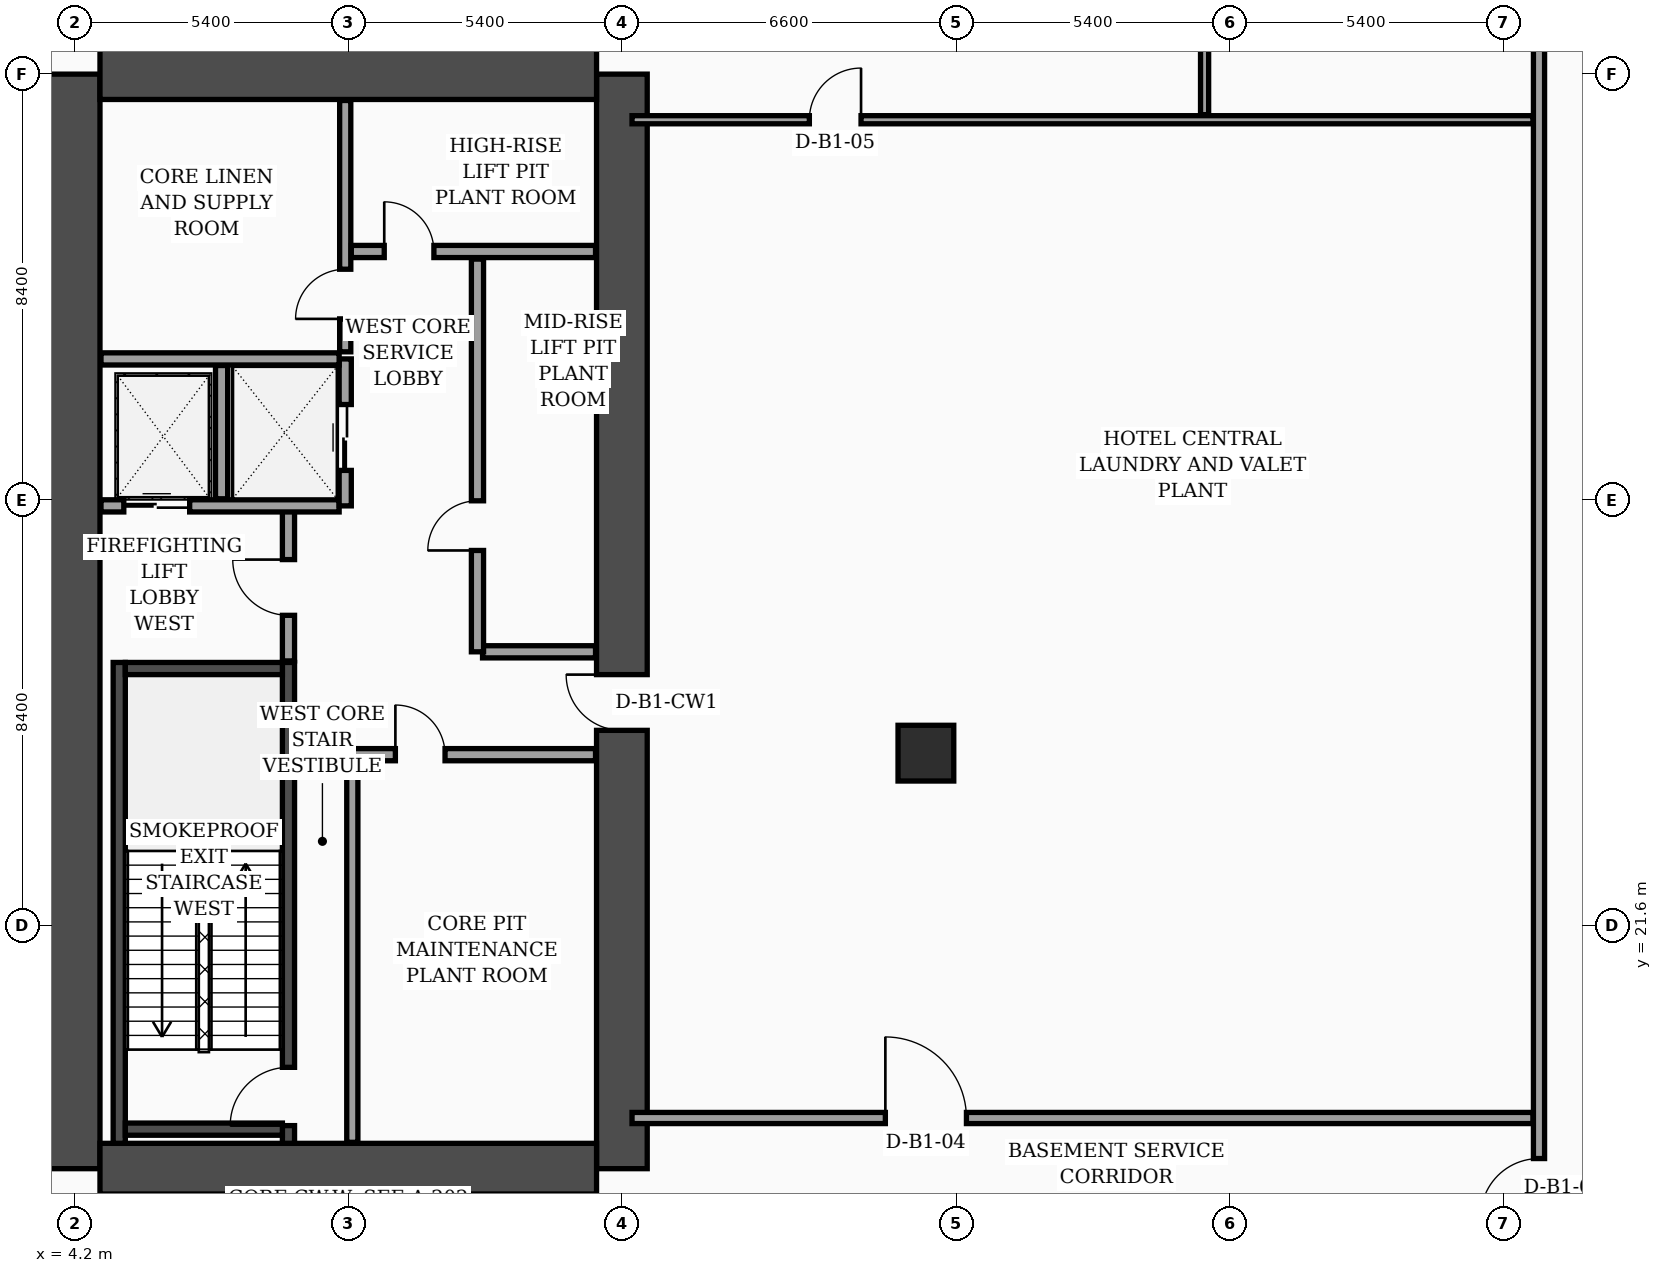
"""IFC4 building model, lengths in metres.
Left out: names, types, materials, properties, quantities, classifications, styles, units other than length and angle.
Written with IfcOpenShell. Run it as: python <this file> out.ifc"""

import sys

from ifc_helpers import new_model, si_unit, direction, frame, frame_2d, origin, origin_2d, place, context, subcontext, project, spatial, rectangle, hollow_rectangle, extrude, element, fill, save


model = new_model("IFC4")
c1 = context("Model", 3, precision=1e-05, world=origin(), true_north=direction((0.0, 1.0)))
c2 = subcontext(c1, "Body", "Model", "MODEL_VIEW")
j1 = project(units=[si_unit("LENGTHUNIT", "METRE"), si_unit("PLANEANGLEUNIT", "RADIAN")], contexts=[c1])
p1 = place(None, origin())
s1 = spatial("IfcSite", under=j1, at=p1, CompositionType="ELEMENT")
p2 = place(p1, origin())
s2 = spatial("IfcBuilding", under=s1, at=p2, CompositionType="ELEMENT")
p3 = place(p2, frame((0.0, 0.0, -5.2)))
s3 = spatial("IfcBuildingStorey", under=s2, at=p3, CompositionType="ELEMENT", Elevation=-5.2)
p4 = place(p3, frame((4.2, 16.8, 0.0), z_axis=(0.0, 0.0, 1.0), x_axis=(0.0, 1.0, 0.0)))
e1 = element("IfcWall", 1, at=p4, inside=s3, PredefinedType="SHEAR", context=c2, shape_type="SweptSolid", body=[
    extrude(rectangle(XDim=21.6, YDim=1.0, at=frame_2d((10.8, 0.0))), origin(), (0.0, 0.0, 1.0), 4.88),
])
p5 = place(p3, frame((15.0, 16.8, 0.0), z_axis=(0.0, 0.0, 1.0), x_axis=(0.0, 1.0, 0.0)))
e2 = element("IfcWall", 2, at=p5, inside=s3, PredefinedType="SHEAR", context=c2, shape_type="SweptSolid", body=[
    extrude(rectangle(XDim=21.6, YDim=1.0, at=frame_2d((10.8, 0.0))), origin(), (0.0, 0.0, 1.0), 4.88),
])
p6 = place(p5, frame((8.65, 0.0, 0.0)))
e3 = element("IfcOpeningElement", 3, at=p6, cuts=e2, PredefinedType="OPENING", context=c2, shape_type="SweptSolid", body=[
    extrude(rectangle(XDim=1.1, YDim=2.2, at=frame_2d((0.55, 1.1))), frame((0.0, 0.51, 0.0), z_axis=(0.0, -1.0, 0.0), x_axis=(1.0, 0.0, 0.0)), (0.0, 0.0, 1.0), 1.02),
])
for number, where, z_axis, x_axis in (
    (4, (4.7, 38.4, 0.0), (0.0, 0.0, 1.0), (1.0, 0.0, 0.0)),
    (5, (4.7, 16.8, 0.0), (0.0, 0.0, 1.0), (1.0, 0.0, 0.0)),
):
    element("IfcWall", number, at=place(p3, frame(where, z_axis=z_axis, x_axis=x_axis)), inside=s3, PredefinedType="SHEAR", context=c2, shape_type="SweptSolid", body=[
        extrude(rectangle(XDim=9.8, YDim=1.0, at=frame_2d((4.9, 0.0))), origin(), (0.0, 0.0, 1.0), 4.88),
    ])
p7 = place(p3, frame((5.08, 17.3, 0.0), z_axis=(0.0, 0.0, 1.0), x_axis=(0.0, 1.0, 0.0)))
e6 = element("IfcWall", 6, at=p7, inside=s3, PredefinedType="SOLIDWALL", context=c2, shape_type="SweptSolid", body=[
    extrude(rectangle(XDim=9.49, YDim=0.24, at=frame_2d((4.745, 0.0))), origin(), (0.0, 0.0, 1.0), 4.88),
])
p8 = place(p3, frame((8.42, 17.3, 0.0), z_axis=(0.0, 0.0, 1.0), x_axis=(0.0, 1.0, 0.0)))
e7 = element("IfcWall", 7, at=p8, inside=s3, PredefinedType="SOLIDWALL", context=c2, shape_type="SweptSolid", body=[
    extrude(rectangle(XDim=9.49, YDim=0.24, at=frame_2d((4.745, 0.0))), origin(), (0.0, 0.0, 1.0), 4.88),
])
p9 = place(p8, frame((0.35, 0.0, 0.0)))
e8 = element("IfcOpeningElement", 8, at=p9, cuts=e7, PredefinedType="OPENING", context=c2, shape_type="SweptSolid", body=[
    extrude(rectangle(XDim=1.15, YDim=2.2, at=frame_2d((0.575, 1.1))), frame((0.0, 0.13, 0.0), z_axis=(0.0, -1.0, 0.0), x_axis=(1.0, 0.0, 0.0)), (0.0, 0.0, 1.0), 0.26),
])
for number, where, z_axis, x_axis in (
    (9, (5.2, 17.58, 0.0), (0.0, 0.0, 1.0), (1.0, 0.0, 0.0)),
    (10, (5.2, 26.67, 0.0), (0.0, 0.0, 1.0), (1.0, 0.0, 0.0)),
):
    element("IfcWall", number, at=place(p3, frame(where, z_axis=z_axis, x_axis=x_axis)), inside=s3, PredefinedType="SOLIDWALL", context=c2, shape_type="SweptSolid", body=[
        extrude(rectangle(XDim=3.1, YDim=0.24, at=frame_2d((1.55, 0.0))), origin(), (0.0, 0.0, 1.0), 4.88),
    ])
p10 = place(p3, frame((21.0, 25.0, 0.0), z_axis=(0.0, 0.0, 1.0), x_axis=(1.0, 0.0, 0.0)))
e11 = element("IfcColumn", 11, at=p10, inside=s3, PredefinedType="COLUMN", context=c2, shape_type="SweptSolid", body=[
    extrude(hollow_rectangle(XDim=1.1, YDim=1.1, WallThickness=0.045, at=origin_2d()), origin(), (0.0, 0.0, 1.0), 4.88),
])
p11 = place(p3, frame((8.42, 26.82, 0.0), z_axis=(0.0, 0.0, 1.0), x_axis=(0.0, 1.0, 0.0)))
e12 = element("IfcWall", 12, at=p11, inside=s3, PredefinedType="SOLIDWALL", context=c2, shape_type="SweptSolid", body=[
    extrude(rectangle(XDim=3.0, YDim=0.24, at=frame_2d((1.5, 0.0))), origin(), (0.0, 0.0, 1.0), 4.88),
])
p12 = place(p11, frame((0.9, 0.0, 0.0)))
e13 = element("IfcOpeningElement", 13, at=p12, cuts=e12, PredefinedType="OPENING", context=c2, shape_type="SweptSolid", body=[
    extrude(rectangle(XDim=1.1, YDim=2.2, at=frame_2d((0.55, 1.1))), frame((0.0, 0.13, 0.0), z_axis=(0.0, -1.0, 0.0), x_axis=(1.0, 0.0, 0.0)), (0.0, 0.0, 1.0), 0.26),
])
p13 = place(p3, frame((4.72, 29.88, 0.0), z_axis=(0.0, 0.0, 1.0), x_axis=(1.0, 0.0, 0.0)))
e14 = element("IfcWall", 14, at=p13, inside=s3, PredefinedType="SOLIDWALL", context=c2, shape_type="SweptSolid", body=[
    extrude(rectangle(XDim=4.7, YDim=0.24, at=frame_2d((2.35, 0.0))), origin(), (0.0, 0.0, 1.0), 4.88),
])
p14 = place(p13, frame((0.45, 0.0, 0.0)))
e15 = element("IfcOpeningElement", 15, at=p14, cuts=e14, PredefinedType="OPENING", context=c2, shape_type="SweptSolid", body=[
    extrude(rectangle(XDim=1.3, YDim=2.35, at=frame_2d((0.65, 1.175))), frame((0.0, 0.13, 0.0), z_axis=(0.0, -1.0, 0.0), x_axis=(1.0, 0.0, 0.0)), (0.0, 0.0, 1.0), 0.26),
])
p15 = place(p3, frame((7.1, 30.02, 0.0), z_axis=(0.0, 0.0, 1.0), x_axis=(0.0, 1.0, 0.0)))
e16 = element("IfcWall", 16, at=p15, inside=s3, PredefinedType="SOLIDWALL", context=c2, shape_type="SweptSolid", body=[
    extrude(rectangle(XDim=2.63, YDim=0.24, at=frame_2d((1.315, 0.0))), origin(), (0.0, 0.0, 1.0), 4.88),
])
p16 = place(p3, frame((9.54, 29.88, 0.0), z_axis=(0.0, 0.0, 1.0), x_axis=(0.0, 1.0, 0.0)))
e17 = element("IfcWall", 17, at=p16, inside=s3, PredefinedType="SOLIDWALL", context=c2, shape_type="SweptSolid", body=[
    extrude(rectangle(XDim=2.9, YDim=0.24, at=frame_2d((1.45, 0.0))), origin(), (0.0, 0.0, 1.0), 4.88),
])
p17 = place(p16, frame((0.7, 0.0, 0.0)))
e18 = element("IfcOpeningElement", 18, at=p17, cuts=e17, PredefinedType="OPENING", context=c2, shape_type="SweptSolid", body=[
    extrude(rectangle(XDim=1.3, YDim=2.35, at=frame_2d((0.65, 1.175))), frame((0.0, 0.13, 0.0), z_axis=(0.0, -1.0, 0.0), x_axis=(1.0, 0.0, 0.0)), (0.0, 0.0, 1.0), 0.26),
])
p18 = place(p3, frame((4.72, 32.78, 0.0), z_axis=(0.0, 0.0, 1.0), x_axis=(1.0, 0.0, 0.0)))
e19 = element("IfcWall", 19, at=p18, inside=s3, PredefinedType="SOLIDWALL", context=c2, shape_type="SweptSolid", body=[
    extrude(rectangle(XDim=4.7, YDim=0.24, at=frame_2d((2.35, 0.0))), origin(), (0.0, 0.0, 1.0), 4.88),
])
p19 = place(p3, frame((9.68, 17.32, 0.0), z_axis=(0.0, 0.0, 1.0), x_axis=(0.0, 1.0, 0.0)))
e20 = element("IfcWall", 20, at=p19, inside=s3, PredefinedType="SOLIDWALL", context=c2, shape_type="SweptSolid", body=[
    extrude(rectangle(XDim=7.68, YDim=0.22, at=frame_2d((3.84, 0.0))), origin(), (0.0, 0.0, 1.0), 4.88),
])
p20 = place(p3, frame((9.54, 32.92, 0.0), z_axis=(0.0, 0.0, 1.0), x_axis=(0.0, 1.0, 0.0)))
e21 = element("IfcWall", 21, at=p20, inside=s3, PredefinedType="SOLIDWALL", context=c2, shape_type="SweptSolid", body=[
    extrude(rectangle(XDim=4.96, YDim=0.22, at=frame_2d((2.48, 0.0))), origin(), (0.0, 0.0, 1.0), 4.88),
])
p21 = place(p20, frame((0.65, 0.0, 0.0)))
e22 = element("IfcOpeningElement", 22, at=p21, cuts=e21, PredefinedType="OPENING", context=c2, shape_type="SweptSolid", body=[
    extrude(rectangle(XDim=0.98, YDim=2.15, at=frame_2d((0.49, 1.075))), frame((0.0, 0.12, 0.0), z_axis=(0.0, -1.0, 0.0), x_axis=(1.0, 0.0, 0.0)), (0.0, 0.0, 1.0), 0.24),
])
p22 = place(p3, frame((9.68, 24.97, 0.0), z_axis=(0.0, 0.0, 1.0), x_axis=(1.0, 0.0, 0.0)))
e23 = element("IfcWall", 23, at=p22, inside=s3, PredefinedType="SOLIDWALL", context=c2, shape_type="SweptSolid", body=[
    extrude(rectangle(XDim=4.8, YDim=0.24, at=frame_2d((2.4, 0.0))), origin(), (0.0, 0.0, 1.0), 4.08),
])
p23 = place(p22, frame((0.85, 0.0, 0.0)))
e24 = element("IfcOpeningElement", 24, at=p23, cuts=e23, PredefinedType="OPENING", context=c2, shape_type="SweptSolid", body=[
    extrude(rectangle(XDim=0.98, YDim=2.15, at=frame_2d((0.49, 1.075))), frame((0.0, 0.13, 0.0), z_axis=(0.0, -1.0, 0.0), x_axis=(1.0, 0.0, 0.0)), (0.0, 0.0, 1.0), 0.26),
])
p24 = place(p3, frame((12.25, 27.0, 0.0), z_axis=(0.0, 0.0, 1.0), x_axis=(1.0, 0.0, 0.0)))
e25 = element("IfcWall", 25, at=p24, inside=s3, PredefinedType="SOLIDWALL", context=c2, shape_type="SweptSolid", body=[
    extrude(rectangle(XDim=2.23, YDim=0.24, at=frame_2d((1.115, 0.0))), origin(), (0.0, 0.0, 1.0), 4.88),
])
p25 = place(p3, frame((12.15, 27.0, 0.0), z_axis=(0.0, 0.0, 1.0), x_axis=(0.0, 1.0, 0.0)))
e26 = element("IfcWall", 26, at=p25, inside=s3, PredefinedType="SOLIDWALL", context=c2, shape_type="SweptSolid", body=[
    extrude(rectangle(XDim=7.75, YDim=0.24, at=frame_2d((3.875, 0.0))), origin(), (0.0, 0.0, 1.0), 4.88),
])
p26 = place(p25, frame((2.0, 0.0, 0.0)))
e27 = element("IfcOpeningElement", 27, at=p26, cuts=e26, PredefinedType="OPENING", context=c2, shape_type="SweptSolid", body=[
    extrude(rectangle(XDim=0.98, YDim=2.15, at=frame_2d((0.49, 1.075))), frame((0.0, 0.13, 0.0), z_axis=(0.0, -1.0, 0.0), x_axis=(1.0, 0.0, 0.0)), (0.0, 0.0, 1.0), 0.26),
])
p27 = place(p3, frame((9.66, 34.9, 0.0), z_axis=(0.0, 0.0, 1.0), x_axis=(1.0, 0.0, 0.0)))
e28 = element("IfcWall", 28, at=p27, inside=s3, PredefinedType="SOLIDWALL", context=c2, shape_type="SweptSolid", body=[
    extrude(rectangle(XDim=4.82, YDim=0.24, at=frame_2d((2.41, 0.0))), origin(), (0.0, 0.0, 1.0), 4.88),
])
p28 = place(p27, frame((0.65, 0.0, 0.0)))
e29 = element("IfcOpeningElement", 29, at=p28, cuts=e28, PredefinedType="OPENING", context=c2, shape_type="SweptSolid", body=[
    extrude(rectangle(XDim=0.98, YDim=2.15, at=frame_2d((0.49, 1.075))), frame((0.0, 0.13, 0.0), z_axis=(0.0, -1.0, 0.0), x_axis=(1.0, 0.0, 0.0)), (0.0, 0.0, 1.0), 0.26),
])
p29 = place(p3, frame((33.1, 15.2, 0.0), z_axis=(0.0, 0.0, 1.0), x_axis=(0.0, 1.0, 0.0)))
e30 = element("IfcWall", 30, at=p29, inside=s3, PredefinedType="SOLIDWALL", context=c2, shape_type="SweptSolid", body=[
    extrude(rectangle(XDim=42.38, YDim=0.22, at=frame_2d((21.19, 0.0))), origin(), (0.0, 0.0, 1.0), 4.08),
])
p30 = place(p29, frame((0.65, 0.0, 0.0)))
e31 = element("IfcOpeningElement", 31, at=p30, cuts=e30, PredefinedType="OPENING", context=c2, shape_type="SweptSolid", body=[
    extrude(rectangle(XDim=1.15, YDim=2.2, at=frame_2d((0.575, 1.1))), frame((0.0, 0.12, 0.0), z_axis=(0.0, -1.0, 0.0), x_axis=(1.0, 0.0, 0.0)), (0.0, 0.0, 1.0), 0.24),
])
p31 = place(p29, frame((24.2, 0.0, 0.0)))
e32 = element("IfcOpeningElement", 32, at=p31, cuts=e30, PredefinedType="OPENING", context=c2, shape_type="SweptSolid", body=[
    extrude(rectangle(XDim=1.02, YDim=2.2, at=frame_2d((0.51, 1.1))), frame((0.0, 0.12, 0.0), z_axis=(0.0, -1.0, 0.0), x_axis=(1.0, 0.0, 0.0)), (0.0, 0.0, 1.0), 0.24),
])
p32 = place(p29, frame((29.4, 0.0, 0.0)))
e33 = element("IfcOpeningElement", 33, at=p32, cuts=e30, PredefinedType="OPENING", context=c2, shape_type="SweptSolid", body=[
    extrude(rectangle(XDim=0.98, YDim=2.15, at=frame_2d((0.49, 1.075))), frame((0.0, 0.12, 0.0), z_axis=(0.0, -1.0, 0.0), x_axis=(1.0, 0.0, 0.0)), (0.0, 0.0, 1.0), 0.24),
])
p33 = place(p3, frame((15.2, 17.8, 0.0), z_axis=(0.0, 0.0, 1.0), x_axis=(1.0, 0.0, 0.0)))
e34 = element("IfcWall", 34, at=p33, inside=s3, PredefinedType="SOLIDWALL", context=c2, shape_type="SweptSolid", body=[
    extrude(rectangle(XDim=17.78, YDim=0.22, at=frame_2d((8.89, 0.0))), origin(), (0.0, 0.0, 1.0), 4.88),
])
p34 = place(p33, frame((5.0, 0.0, 0.0)))
e35 = element("IfcOpeningElement", 35, at=p34, cuts=e34, PredefinedType="OPENING", context=c2, shape_type="SweptSolid", body=[
    extrude(rectangle(XDim=1.6, YDim=2.35, at=frame_2d((0.8, 1.175))), frame((0.0, 0.12, 0.0), z_axis=(0.0, -1.0, 0.0), x_axis=(1.0, 0.0, 0.0)), (0.0, 0.0, 1.0), 0.24),
])
p35 = place(p3, frame((15.2, 37.5, 0.0), z_axis=(0.0, 0.0, 1.0), x_axis=(1.0, 0.0, 0.0)))
e36 = element("IfcWall", 36, at=p35, inside=s3, PredefinedType="PARTITIONING", context=c2, shape_type="SweptSolid", body=[
    extrude(rectangle(XDim=17.78, YDim=0.16, at=frame_2d((8.89, 0.0))), origin(), (0.0, 0.0, 1.0), 4.38),
])
p36 = place(p35, frame((3.5, 0.0, 0.0)))
e37 = element("IfcOpeningElement", 37, at=p36, cuts=e36, PredefinedType="OPENING", context=c2, shape_type="SweptSolid", body=[
    extrude(rectangle(XDim=1.02, YDim=2.2, at=frame_2d((0.51, 1.1))), frame((0.0, 0.09, 0.0), z_axis=(0.0, -1.0, 0.0), x_axis=(1.0, 0.0, 0.0)), (0.0, 0.0, 1.0), 0.18),
])
p37 = place(p3, frame((26.5, 37.6, 0.0), z_axis=(0.0, 0.0, 1.0), x_axis=(0.0, 1.0, 0.0)))
e38 = element("IfcWall", 38, at=p37, inside=s3, PredefinedType="PARTITIONING", context=c2, shape_type="SweptSolid", body=[
    extrude(rectangle(XDim=19.98, YDim=0.16, at=frame_2d((9.99, 0.0))), origin(), (0.0, 0.0, 1.0), 4.08),
])
p38 = place(p12, origin())
e39 = element("IfcDoor", 39, at=p38, inside=s3, OperationType="SINGLE_SWING_RIGHT", PredefinedType="DOOR", context=c2, shape_type="SweptSolid", body=[
    extrude(rectangle(XDim=1.1, YDim=2.2, at=frame_2d((0.55, 1.1))), frame((0.0, 0.025, 0.0), z_axis=(0.0, -1.0, 0.0), x_axis=(1.0, 0.0, 0.0)), (0.0, 0.0, 1.0), 0.05),
])
fill(e13, e39)
p39 = place(p14, origin())
e40 = element("IfcDoor", 40, at=p39, inside=s3, OperationType="DOUBLE_DOOR_SLIDING", PredefinedType="DOOR", context=c2, shape_type="SweptSolid", body=[
    extrude(rectangle(XDim=1.3, YDim=2.35, at=frame_2d((0.65, 1.175))), frame((0.0, 0.025, 0.0), z_axis=(0.0, -1.0, 0.0), x_axis=(1.0, 0.0, 0.0)), (0.0, 0.0, 1.0), 0.05),
])
fill(e15, e40)
p40 = place(p17, origin())
e41 = element("IfcDoor", 41, at=p40, inside=s3, OperationType="DOUBLE_DOOR_SLIDING", PredefinedType="DOOR", context=c2, shape_type="SweptSolid", body=[
    extrude(rectangle(XDim=1.3, YDim=2.35, at=frame_2d((0.65, 1.175))), frame((0.0, 0.025, 0.0), z_axis=(0.0, -1.0, 0.0), x_axis=(1.0, 0.0, 0.0)), (0.0, 0.0, 1.0), 0.05),
])
fill(e18, e41)
p41 = place(p21, origin())
e42 = element("IfcDoor", 42, at=p41, inside=s3, OperationType="SINGLE_SWING_LEFT", PredefinedType="DOOR", context=c2, shape_type="SweptSolid", body=[
    extrude(rectangle(XDim=0.98, YDim=2.15, at=frame_2d((0.49, 1.075))), frame((0.0, 0.025, 0.0), z_axis=(0.0, -1.0, 0.0), x_axis=(1.0, 0.0, 0.0)), (0.0, 0.0, 1.0), 0.05),
])
fill(e22, e42)
p42 = place(p23, origin())
e43 = element("IfcDoor", 43, at=p42, inside=s3, OperationType="SINGLE_SWING_LEFT", PredefinedType="DOOR", context=c2, shape_type="SweptSolid", body=[
    extrude(rectangle(XDim=0.98, YDim=2.15, at=frame_2d((0.49, 1.075))), frame((0.0, 0.025, 0.0), z_axis=(0.0, -1.0, 0.0), x_axis=(1.0, 0.0, 0.0)), (0.0, 0.0, 1.0), 0.05),
])
fill(e24, e43)
p43 = place(p26, origin())
e44 = element("IfcDoor", 44, at=p43, inside=s3, OperationType="SINGLE_SWING_LEFT", PredefinedType="DOOR", context=c2, shape_type="SweptSolid", body=[
    extrude(rectangle(XDim=0.98, YDim=2.15, at=frame_2d((0.49, 1.075))), frame((0.0, 0.025, 0.0), z_axis=(0.0, -1.0, 0.0), x_axis=(1.0, 0.0, 0.0)), (0.0, 0.0, 1.0), 0.05),
])
fill(e27, e44)
p44 = place(p28, origin())
e45 = element("IfcDoor", 45, at=p44, inside=s3, OperationType="SINGLE_SWING_LEFT", PredefinedType="DOOR", context=c2, shape_type="SweptSolid", body=[
    extrude(rectangle(XDim=0.98, YDim=2.15, at=frame_2d((0.49, 1.075))), frame((0.0, 0.025, 0.0), z_axis=(0.0, -1.0, 0.0), x_axis=(1.0, 0.0, 0.0)), (0.0, 0.0, 1.0), 0.05),
])
fill(e29, e45)
p45 = place(p30, origin())
e46 = element("IfcDoor", 46, at=p45, inside=s3, OperationType="SINGLE_SWING_LEFT", PredefinedType="DOOR", context=c2, shape_type="SweptSolid", body=[
    extrude(rectangle(XDim=1.15, YDim=2.2, at=frame_2d((0.575, 1.1))), frame((0.0, 0.025, 0.0), z_axis=(0.0, -1.0, 0.0), x_axis=(1.0, 0.0, 0.0)), (0.0, 0.0, 1.0), 0.05),
])
fill(e31, e46)
p46 = place(p34, origin())
e47 = element("IfcDoor", 47, at=p46, inside=s3, OperationType="SINGLE_SWING_LEFT", PredefinedType="DOOR", context=c2, shape_type="SweptSolid", body=[
    extrude(rectangle(XDim=1.6, YDim=2.35, at=frame_2d((0.8, 1.175))), frame((0.0, 0.025, 0.0), z_axis=(0.0, -1.0, 0.0), x_axis=(1.0, 0.0, 0.0)), (0.0, 0.0, 1.0), 0.05),
])
fill(e35, e47)
p47 = place(p36, origin())
e48 = element("IfcDoor", 48, at=p47, inside=s3, OperationType="SINGLE_SWING_RIGHT", PredefinedType="DOOR", context=c2, shape_type="SweptSolid", body=[
    extrude(rectangle(XDim=1.02, YDim=2.2, at=frame_2d((0.51, 1.1))), frame((0.0, 0.025, 0.0), z_axis=(0.0, -1.0, 0.0), x_axis=(1.0, 0.0, 0.0)), (0.0, 0.0, 1.0), 0.05),
])
fill(e37, e48)
p48 = place(p9, origin())
e49 = element("IfcDoor", 49, at=p48, inside=s3, OperationType="SINGLE_SWING_LEFT", PredefinedType="DOOR", context=c2, shape_type="SweptSolid", body=[
    extrude(rectangle(XDim=1.15, YDim=2.2, at=frame_2d((0.575, 1.1))), frame((0.0, 0.025, 0.0), z_axis=(0.0, -1.0, 0.0), x_axis=(1.0, 0.0, 0.0)), (0.0, 0.0, 1.0), 0.05),
])
fill(e8, e49)
p49 = place(p6, origin())
e50 = element("IfcDoor", 50, at=p49, inside=s3, OperationType="SINGLE_SWING_RIGHT", PredefinedType="DOOR", context=c2, shape_type="SweptSolid", body=[
    extrude(rectangle(XDim=1.1, YDim=2.2, at=frame_2d((0.55, 1.1))), frame((0.0, 0.025, 0.0), z_axis=(0.0, -1.0, 0.0), x_axis=(1.0, 0.0, 0.0)), (0.0, 0.0, 1.0), 0.05),
])
fill(e3, e50)
save(model, sys.argv[1])
